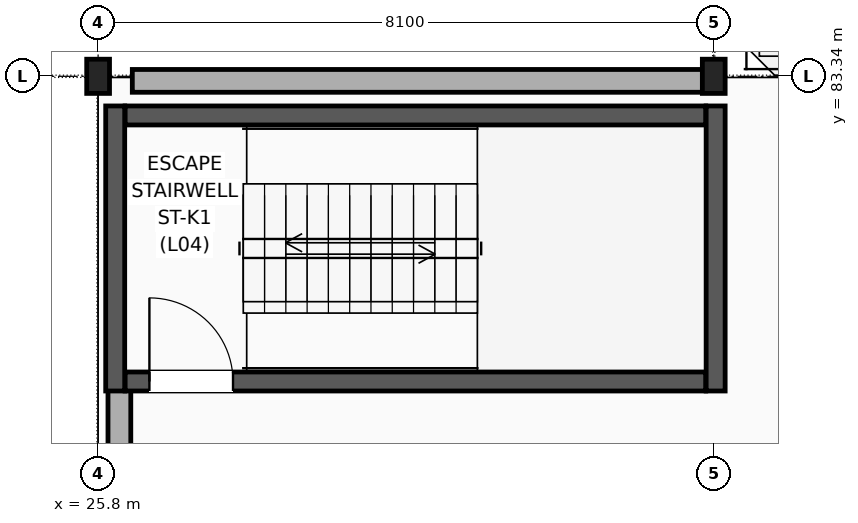
"""IFC4 building model, lengths in metres.
Left out: names, types, materials, properties, quantities, classifications, styles, units other than length and angle.
Written with IfcOpenShell. Run it as: python <this file> out.ifc"""

import sys

from ifc_helpers import new_model, si_unit, direction, frame, frame_2d, origin, origin_2d, place, context, subcontext, project, spatial, rectangle, i_section, extrude, element, fill, save


model = new_model("IFC4")
c1 = context("Model", 3, precision=1e-05, world=origin(), true_north=direction((0.0, 1.0)))
c2 = subcontext(c1, "Body", "Model", "MODEL_VIEW")
j1 = project(units=[si_unit("LENGTHUNIT", "METRE"), si_unit("PLANEANGLEUNIT", "RADIAN")], contexts=[c1])
p1 = place(None, origin())
s1 = spatial("IfcSite", under=j1, at=p1, CompositionType="ELEMENT")
p2 = place(p1, origin())
s2 = spatial("IfcBuilding", under=s1, at=p2, CompositionType="ELEMENT")
p3 = place(p2, frame((0.0, 0.0, 19.2)))
s3 = spatial("IfcBuildingStorey", under=s2, at=p3, CompositionType="ELEMENT", Elevation=19.2)
for number, where, z_axis, x_axis in (
    (1, (25.8, 83.34, 0.0), (0.0, 0.0, 1.0), (1.0, 0.0, 0.0)),
    (2, (33.9, 83.34, 0.0), (0.0, 0.0, 1.0), (1.0, 0.0, 0.0)),
):
    element("IfcColumn", number, at=place(p3, frame(where, z_axis=z_axis, x_axis=x_axis)), inside=s3, PredefinedType="COLUMN", context=c2, shape_type="SweptSolid", body=[
        extrude(i_section(OverallWidth=0.3, OverallDepth=0.45, WebThickness=0.014, FlangeThickness=0.026, FilletRadius=0.027, at=origin_2d()), origin(), (0.0, 0.0, 1.0), 4.2),
    ])
p4 = place(p3, frame((26.08, 61.35, 0.0), z_axis=(0.0, 0.0, 1.0), x_axis=(0.0, 1.0, 0.0)))
e3 = element("IfcWall", 3, at=p4, inside=s3, PredefinedType="SOLIDWALL", context=c2, shape_type="SweptSolid", body=[
    extrude(rectangle(XDim=17.95, YDim=0.3, at=frame_2d((8.975, 0.0))), origin(), (0.0, 0.0, 1.0), 3.345),
])
p5 = place(p3, frame((26.25, 83.28, 0.0), z_axis=(0.0, 0.0, 1.0), x_axis=(1.0, 0.0, 0.0)))
e4 = element("IfcWall", 4, at=p5, inside=s3, PredefinedType="SOLIDWALL", context=c2, shape_type="SweptSolid", body=[
    extrude(rectangle(XDim=7.55, YDim=0.3, at=frame_2d((3.775, 0.0))), origin(), (0.0, 0.0, 1.0), 3.345),
])
p6 = place(p3, frame((26.155, 79.325, 0.0), z_axis=(0.0, 0.0, 1.0), x_axis=(1.0, 0.0, 0.0)))
e5 = element("IfcWall", 5, at=p6, inside=s3, PredefinedType="SHEAR", context=c2, shape_type="SweptSolid", body=[
    extrude(rectangle(XDim=7.64, YDim=0.25, at=frame_2d((3.82, 0.0))), origin(), (0.0, 0.0, 1.0), 3.965),
])
p7 = place(p6, frame((0.32, 0.0, 0.0)))
e6 = element("IfcOpeningElement", 6, at=p7, cuts=e5, PredefinedType="OPENING", context=c2, shape_type="SweptSolid", body=[
    extrude(rectangle(XDim=1.1, YDim=2.2, at=frame_2d((0.55, 1.1))), frame((0.0, 0.135, 0.0), z_axis=(0.0, -1.0, 0.0), x_axis=(1.0, 0.0, 0.0)), (0.0, 0.0, 1.0), 0.27),
])
p8 = place(p3, frame((26.155, 82.825, 0.0), z_axis=(0.0, 0.0, 1.0), x_axis=(1.0, 0.0, 0.0)))
e7 = element("IfcWall", 7, at=p8, inside=s3, PredefinedType="SHEAR", context=c2, shape_type="SweptSolid", body=[
    extrude(rectangle(XDim=7.64, YDim=0.25, at=frame_2d((3.82, 0.0))), origin(), (0.0, 0.0, 1.0), 3.965),
])
for number, where, z_axis, x_axis in (
    (8, (26.025, 79.2, 0.0), (0.0, 0.0, 1.0), (0.0, 1.0, 0.0)),
    (9, (33.925, 79.2, 0.0), (0.0, 0.0, 1.0), (0.0, 1.0, 0.0)),
):
    element("IfcWall", number, at=place(p3, frame(where, z_axis=z_axis, x_axis=x_axis)), inside=s3, PredefinedType="SHEAR", context=c2, shape_type="SweptSolid", body=[
        extrude(rectangle(XDim=3.75, YDim=0.25, at=frame_2d((1.875, 0.0))), origin(), (0.0, 0.0, 1.0), 3.965),
    ])
p9 = place(p7, origin())
e10 = element("IfcDoor", 10, at=p9, inside=s3, OperationType="SINGLE_SWING_LEFT", PredefinedType="DOOR", context=c2, shape_type="SweptSolid", body=[
    extrude(rectangle(XDim=1.1, YDim=2.2, at=frame_2d((0.55, 1.1))), frame((0.0, 0.025, 0.0), z_axis=(0.0, -1.0, 0.0), x_axis=(1.0, 0.0, 0.0)), (0.0, 0.0, 1.0), 0.05),
])
fill(e6, e10)
save(model, sys.argv[1])
